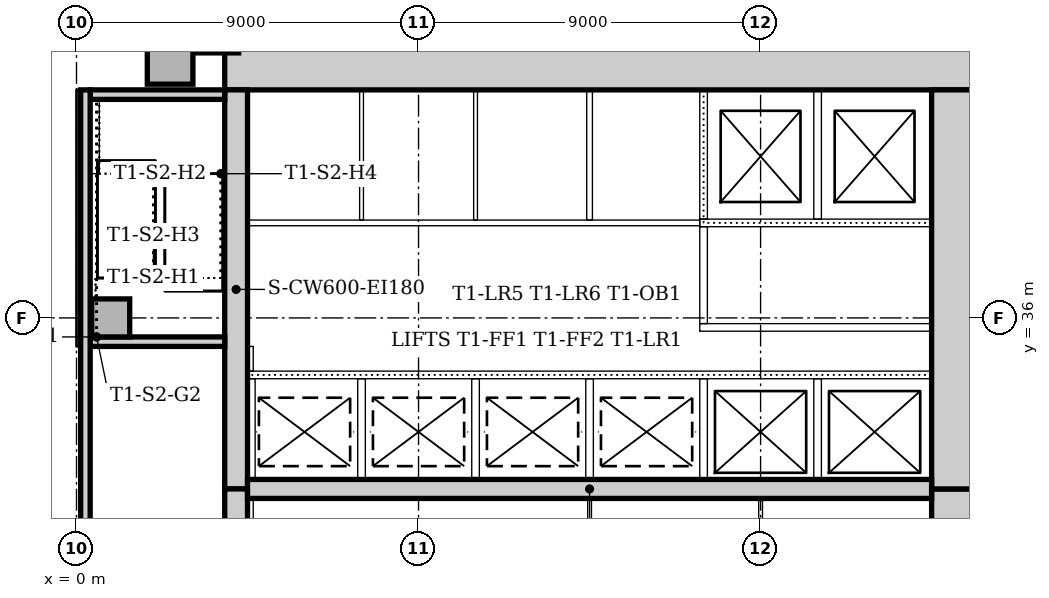
"""IFC4 building model, lengths in metres.
Left out: names, types, materials, properties, quantities, classifications, styles, units other than length and angle.
Written with IfcOpenShell. Run it as: python <this file> out.ifc"""

import sys

from ifc_helpers import new_model, si_unit, direction, frame, frame_2d, origin, origin_2d, place, context, subcontext, project, spatial, rectangle, extrude, element, fill, save


model = new_model("IFC4")
c1 = context("Model", 3, precision=1e-05, world=origin(), true_north=direction((0.0, 1.0)))
c2 = subcontext(c1, "Body", "Model", "MODEL_VIEW")
j1 = project(units=[si_unit("LENGTHUNIT", "METRE"), si_unit("PLANEANGLEUNIT", "RADIAN")], contexts=[c1])
p1 = place(None, origin())
s1 = spatial("IfcSite", under=j1, at=p1, CompositionType="ELEMENT")
p2 = place(p1, origin())
s2 = spatial("IfcBuilding", under=s1, at=p2, CompositionType="ELEMENT")
p3 = place(p2, origin())
s3 = spatial("IfcBuildingStorey", under=s2, at=p3, CompositionType="ELEMENT", Elevation=0.0)
p4 = place(p3, frame((23.7, 42.6, 0.0), z_axis=(0.0, 0.0, 1.0), x_axis=(-1.0, 0.0, 0.0)))
e1 = element("IfcWall", 1, at=p4, inside=s3, PredefinedType="SOLIDWALL", context=c2, shape_type="SweptSolid", body=[
    extrude(rectangle(XDim=19.8, YDim=1.2, at=frame_2d((9.9, 0.0))), origin(), (0.0, 0.0, 1.0), 6.0),
])
p5 = place(p3, frame((23.1, 21.0, 0.0), z_axis=(0.0, 0.0, 1.0), x_axis=(0.0, 1.0, 0.0)))
e2 = element("IfcWall", 2, at=p5, inside=s3, PredefinedType="SOLIDWALL", context=c2, shape_type="SweptSolid", body=[
    extrude(rectangle(XDim=10.5, YDim=1.2, at=frame_2d((5.25, 0.0))), origin(), (0.0, 0.0, 1.0), 6.0),
])
p6 = place(p5, frame((4.35, 0.0, 0.0)))
e3 = element("IfcOpeningElement", 3, at=p6, cuts=e2, PredefinedType="OPENING", context=c2, shape_type="SweptSolid", body=[
    extrude(rectangle(XDim=1.8, YDim=2.1, at=frame_2d((0.9, 1.05))), frame((0.0, 0.61, 0.0), z_axis=(0.0, -1.0, 0.0), x_axis=(1.0, 0.0, 0.0)), (0.0, 0.0, 1.0), 1.22),
])
p7 = place(p3, frame((23.1, 31.5, 0.0), z_axis=(0.0, 0.0, 1.0), x_axis=(0.0, 1.0, 0.0)))
e4 = element("IfcWall", 4, at=p7, inside=s3, PredefinedType="SOLIDWALL", context=c2, shape_type="SweptSolid", body=[
    extrude(rectangle(XDim=10.5, YDim=1.2, at=frame_2d((5.25, 0.0))), origin(), (0.0, 0.0, 1.0), 6.0),
])
p8 = place(p7, frame((3.15, 0.0, 0.0)))
e5 = element("IfcOpeningElement", 5, at=p8, cuts=e4, PredefinedType="OPENING", context=c2, shape_type="SweptSolid", body=[
    extrude(rectangle(XDim=1.0, YDim=2.1, at=frame_2d((0.5, 1.05))), frame((0.0, 0.61, 0.0), z_axis=(0.0, -1.0, 0.0), x_axis=(1.0, 0.0, 0.0)), (0.0, 0.0, 1.0), 1.22),
])
p9 = place(p7, frame((5.2, 0.0, 0.0)))
e6 = element("IfcOpeningElement", 6, at=p9, cuts=e4, PredefinedType="OPENING", context=c2, shape_type="SweptSolid", body=[
    extrude(rectangle(XDim=1.0, YDim=2.1, at=frame_2d((0.5, 1.05))), frame((0.0, 0.61, 0.0), z_axis=(0.0, -1.0, 0.0), x_axis=(1.0, 0.0, 0.0)), (0.0, 0.0, 1.0), 1.22),
])
p10 = place(p3, frame((4.2, 42.0, 0.0), z_axis=(0.0, 0.0, 1.0), x_axis=(0.0, -1.0, 0.0)))
e7 = element("IfcWall", 7, at=p10, inside=s3, PredefinedType="SOLIDWALL", context=c2, shape_type="SweptSolid", body=[
    extrude(rectangle(XDim=10.5, YDim=0.6, at=frame_2d((5.25, 0.0))), origin(), (0.0, 0.0, 1.0), 6.0),
])
p11 = place(p10, frame((5.3, 0.0, 0.0)))
e8 = element("IfcOpeningElement", 8, at=p11, cuts=e7, PredefinedType="OPENING", context=c2, shape_type="SweptSolid", body=[
    extrude(rectangle(XDim=1.0, YDim=2.1, at=frame_2d((0.5, 1.05))), frame((0.0, 0.31, 0.0), z_axis=(0.0, -1.0, 0.0), x_axis=(1.0, 0.0, 0.0)), (0.0, 0.0, 1.0), 0.62),
])
p12 = place(p3, frame((4.2, 31.5, 0.0), z_axis=(0.0, 0.0, 1.0), x_axis=(0.0, -1.0, 0.0)))
e9 = element("IfcWall", 9, at=p12, inside=s3, PredefinedType="SOLIDWALL", context=c2, shape_type="SweptSolid", body=[
    extrude(rectangle(XDim=10.5, YDim=0.6, at=frame_2d((5.25, 0.0))), origin(), (0.0, 0.0, 1.0), 6.0),
])
p13 = place(p12, frame((4.25, 0.0, 0.0)))
e10 = element("IfcOpeningElement", 10, at=p13, cuts=e9, PredefinedType="OPENING", context=c2, shape_type="SweptSolid", body=[
    extrude(rectangle(XDim=1.0, YDim=2.1, at=frame_2d((0.5, 1.05))), frame((0.0, 0.31, 0.0), z_axis=(0.0, -1.0, 0.0), x_axis=(1.0, 0.0, 0.0)), (0.0, 0.0, 1.0), 0.62),
])
p14 = place(p3, frame((4.5, 31.5, 0.0), z_axis=(0.0, 0.0, 1.0), x_axis=(1.0, 0.0, 0.0)))
e11 = element("IfcWall", 11, at=p14, inside=s3, PredefinedType="SOLIDWALL", context=c2, shape_type="SweptSolid", body=[
    extrude(rectangle(XDim=18.0, YDim=0.5, at=frame_2d((9.0, 0.0))), origin(), (0.0, 0.0, 1.0), 6.0),
])
p15 = place(p3, frame((0.36, 35.375, 0.0), z_axis=(0.0, 0.0, 1.0), x_axis=(1.0, 0.0, 0.0)))
e12 = element("IfcWall", 12, at=p15, inside=s3, PredefinedType="SOLIDWALL", context=c2, shape_type="SweptSolid", body=[
    extrude(rectangle(XDim=3.54, YDim=0.25, at=frame_2d((1.77, 0.0))), origin(), (0.0, 0.0, 1.0), 6.0),
])
p16 = place(p15, frame((2.14, 0.0, 0.0)))
e13 = element("IfcOpeningElement", 13, at=p16, cuts=e12, PredefinedType="OPENING", context=c2, shape_type="SweptSolid", body=[
    extrude(rectangle(XDim=1.0, YDim=2.1, at=frame_2d((0.5, 1.05))), frame((0.0, 0.135, 0.0), z_axis=(0.0, -1.0, 0.0), x_axis=(1.0, 0.0, 0.0)), (0.0, 0.0, 1.0), 0.27),
])
p17 = place(p3, frame((3.9, 41.875, 0.0), z_axis=(0.0, 0.0, 1.0), x_axis=(-1.0, 0.0, 0.0)))
e14 = element("IfcWall", 14, at=p17, inside=s3, PredefinedType="SOLIDWALL", context=c2, shape_type="SweptSolid", body=[
    extrude(rectangle(XDim=3.54, YDim=0.25, at=frame_2d((1.77, 0.0))), origin(), (0.0, 0.0, 1.0), 6.0),
])
p18 = place(p3, frame((0.235, 21.0, 0.0), z_axis=(0.0, 0.0, 1.0), x_axis=(0.0, 1.0, 0.0)))
e15 = element("IfcWall", 15, at=p18, inside=s3, PredefinedType="SOLIDWALL", context=c2, shape_type="SweptSolid", body=[
    extrude(rectangle(XDim=21.0, YDim=0.25, at=frame_2d((10.5, 0.0))), origin(), (0.0, 0.0, 1.0), 6.0),
])
p19 = place(p18, frame((10.0, 0.0, 0.0)))
e16 = element("IfcOpeningElement", 16, at=p19, cuts=e15, PredefinedType="OPENING", context=c2, shape_type="SweptSolid", body=[
    extrude(rectangle(XDim=1.0, YDim=2.1, at=frame_2d((0.5, 1.05))), frame((0.0, 0.135, 0.0), z_axis=(0.0, -1.0, 0.0), x_axis=(1.0, 0.0, 0.0)), (0.0, 0.0, 1.0), 0.27),
])
for number, where, z_axis, x_axis in (
    (17, (3.667, 43.574, 0.0), (0.0, 0.0, 1.0), (1.0, 0.0, 0.0)),
    (18, (2.463, 42.75, 0.0), (0.0, 0.0, 1.0), (1.0, 0.0, 0.0)),
):
    element("IfcColumn", number, at=place(p3, frame(where, z_axis=z_axis, x_axis=x_axis)), inside=s3, PredefinedType="COLUMN", context=c2, shape_type="SweptSolid", body=[
        extrude(rectangle(XDim=1.2, YDim=1.2, at=origin_2d()), origin(), (0.0, 0.0, 1.0), 5.7),
    ])
p20 = place(p3, frame((0.9, 36.0, 0.0), z_axis=(0.0, 0.0, 1.0), x_axis=(1.0, 0.0, 0.0)))
e19 = element("IfcColumn", 19, at=p20, inside=s3, PredefinedType="COLUMN", context=c2, shape_type="SweptSolid", body=[
    extrude(rectangle(XDim=1.0, YDim=1.0, at=origin_2d()), origin(), (0.0, 0.0, 1.0), 6.0),
])
p21 = place(p3, frame((0.48, 39.795, 0.0), z_axis=(0.0, 0.0, 1.0), x_axis=(0.0, 1.0, 0.0)))
e20 = element("IfcWall", 20, at=p21, inside=s3, PredefinedType="STANDARD", context=c2, shape_type="SweptSolid", body=[
    extrude(rectangle(XDim=1.955, YDim=0.24, at=frame_2d((0.978, 0.0))), origin(), (0.0, 0.0, 1.0), 6.0),
])
p22 = place(p3, frame((16.4, 35.75, 0.0), z_axis=(0.0, 0.0, 1.0), x_axis=(1.0, 0.0, 0.0)))
e21 = element("IfcWall", 21, at=p22, inside=s3, PredefinedType="PARTITIONING", context=c2, shape_type="SweptSolid", body=[
    extrude(rectangle(XDim=6.1, YDim=0.2, at=frame_2d((3.05, 0.0))), origin(), (0.0, 0.0, 1.0), 5.7),
])
p23 = place(p3, frame((16.4, 38.5, 0.0), z_axis=(0.0, 0.0, 1.0), x_axis=(1.0, 0.0, 0.0)))
e22 = element("IfcWall", 22, at=p23, inside=s3, PredefinedType="PARTITIONING", context=c2, shape_type="SweptSolid", body=[
    extrude(rectangle(XDim=6.1, YDim=0.2, at=frame_2d((3.05, 0.0))), origin(), (0.0, 0.0, 1.0), 5.7),
])
p24 = place(p23, frame((1.0, 0.0, 0.0)))
e23 = element("IfcOpeningElement", 23, at=p24, cuts=e22, PredefinedType="OPENING", context=c2, shape_type="SweptSolid", body=[
    extrude(rectangle(XDim=1.2, YDim=2.1, at=frame_2d((0.6, 1.05))), frame((0.0, 0.11, 0.0), z_axis=(0.0, -1.0, 0.0), x_axis=(1.0, 0.0, 0.0)), (0.0, 0.0, 1.0), 0.22),
])
p25 = place(p23, frame((4.0, 0.0, 0.0)))
e24 = element("IfcOpeningElement", 24, at=p25, cuts=e22, PredefinedType="OPENING", context=c2, shape_type="SweptSolid", body=[
    extrude(rectangle(XDim=1.2, YDim=2.1, at=frame_2d((0.6, 1.05))), frame((0.0, 0.11, 0.0), z_axis=(0.0, -1.0, 0.0), x_axis=(1.0, 0.0, 0.0)), (0.0, 0.0, 1.0), 0.22),
])
p26 = place(p3, frame((16.5, 35.85, 0.0), z_axis=(0.0, 0.0, 1.0), x_axis=(0.0, 1.0, 0.0)))
e25 = element("IfcWall", 25, at=p26, inside=s3, PredefinedType="PARTITIONING", context=c2, shape_type="SweptSolid", body=[
    extrude(rectangle(XDim=2.55, YDim=0.2, at=frame_2d((1.275, 0.0))), origin(), (0.0, 0.0, 1.0), 5.7),
])
p27 = place(p3, frame((4.5, 34.5, 0.0), z_axis=(0.0, 0.0, 1.0), x_axis=(1.0, 0.0, 0.0)))
e26 = element("IfcWall", 26, at=p27, inside=s3, PredefinedType="PARTITIONING", context=c2, shape_type="SweptSolid", body=[
    extrude(rectangle(XDim=18.0, YDim=0.2, at=frame_2d((9.0, 0.0))), origin(), (0.0, 0.0, 1.0), 5.7),
])
p28 = place(p27, frame((0.95, 0.0, 0.0)))
e27 = element("IfcOpeningElement", 27, at=p28, cuts=e26, PredefinedType="OPENING", context=c2, shape_type="SweptSolid", body=[
    extrude(rectangle(XDim=1.1, YDim=2.1, at=frame_2d((0.55, 1.05))), frame((0.0, 0.11, 0.0), z_axis=(0.0, -1.0, 0.0), x_axis=(1.0, 0.0, 0.0)), (0.0, 0.0, 1.0), 0.22),
])
p29 = place(p27, frame((3.95, 0.0, 0.0)))
e28 = element("IfcOpeningElement", 28, at=p29, cuts=e26, PredefinedType="OPENING", context=c2, shape_type="SweptSolid", body=[
    extrude(rectangle(XDim=1.1, YDim=2.1, at=frame_2d((0.55, 1.05))), frame((0.0, 0.11, 0.0), z_axis=(0.0, -1.0, 0.0), x_axis=(1.0, 0.0, 0.0)), (0.0, 0.0, 1.0), 0.22),
])
p30 = place(p27, frame((6.95, 0.0, 0.0)))
e29 = element("IfcOpeningElement", 29, at=p30, cuts=e26, PredefinedType="OPENING", context=c2, shape_type="SweptSolid", body=[
    extrude(rectangle(XDim=1.1, YDim=2.1, at=frame_2d((0.55, 1.05))), frame((0.0, 0.11, 0.0), z_axis=(0.0, -1.0, 0.0), x_axis=(1.0, 0.0, 0.0)), (0.0, 0.0, 1.0), 0.22),
])
p31 = place(p27, frame((9.95, 0.0, 0.0)))
e30 = element("IfcOpeningElement", 30, at=p31, cuts=e26, PredefinedType="OPENING", context=c2, shape_type="SweptSolid", body=[
    extrude(rectangle(XDim=1.1, YDim=2.1, at=frame_2d((0.55, 1.05))), frame((0.0, 0.11, 0.0), z_axis=(0.0, -1.0, 0.0), x_axis=(1.0, 0.0, 0.0)), (0.0, 0.0, 1.0), 0.22),
])
p32 = place(p27, frame((12.95, 0.0, 0.0)))
e31 = element("IfcOpeningElement", 31, at=p32, cuts=e26, PredefinedType="OPENING", context=c2, shape_type="SweptSolid", body=[
    extrude(rectangle(XDim=1.1, YDim=2.1, at=frame_2d((0.55, 1.05))), frame((0.0, 0.11, 0.0), z_axis=(0.0, -1.0, 0.0), x_axis=(1.0, 0.0, 0.0)), (0.0, 0.0, 1.0), 0.22),
])
p33 = place(p27, frame((15.95, 0.0, 0.0)))
e32 = element("IfcOpeningElement", 32, at=p33, cuts=e26, PredefinedType="OPENING", context=c2, shape_type="SweptSolid", body=[
    extrude(rectangle(XDim=1.1, YDim=2.1, at=frame_2d((0.55, 1.05))), frame((0.0, 0.11, 0.0), z_axis=(0.0, -1.0, 0.0), x_axis=(1.0, 0.0, 0.0)), (0.0, 0.0, 1.0), 0.22),
])
for number, where, z_axis, x_axis in (
    (33, (16.5, 38.6, 0.0), (0.0, 0.0, 1.0), (0.0, 1.0, 0.0)),
    (34, (19.5, 38.6, 0.0), (0.0, 0.0, 1.0), (0.0, 1.0, 0.0)),
):
    element("IfcWall", number, at=place(p3, frame(where, z_axis=z_axis, x_axis=x_axis)), inside=s3, PredefinedType="PARTITIONING", context=c2, shape_type="SweptSolid", body=[
        extrude(rectangle(XDim=3.4, YDim=0.2, at=frame_2d((1.7, 0.0))), origin(), (0.0, 0.0, 1.0), 5.7),
    ])
for number, where, z_axis, x_axis in (
    (35, (4.6, 31.75, 0.0), (0.0, 0.0, 1.0), (0.0, 1.0, 0.0)),
    (36, (7.5, 31.75, 0.0), (0.0, 0.0, 1.0), (0.0, 1.0, 0.0)),
    (37, (10.5, 31.75, 0.0), (0.0, 0.0, 1.0), (0.0, 1.0, 0.0)),
    (38, (13.5, 31.75, 0.0), (0.0, 0.0, 1.0), (0.0, 1.0, 0.0)),
    (39, (16.5, 31.75, 0.0), (0.0, 0.0, 1.0), (0.0, 1.0, 0.0)),
    (40, (19.5, 31.75, 0.0), (0.0, 0.0, 1.0), (0.0, 1.0, 0.0)),
):
    element("IfcWall", number, at=place(p3, frame(where, z_axis=z_axis, x_axis=x_axis)), inside=s3, PredefinedType="PARTITIONING", context=c2, shape_type="SweptSolid", body=[
        extrude(rectangle(XDim=2.65, YDim=0.2, at=frame_2d((1.325, 0.0))), origin(), (0.0, 0.0, 1.0), 5.7),
    ])
p34 = place(p3, frame((4.5, 38.5, 0.0), z_axis=(0.0, 0.0, 1.0), x_axis=(1.0, 0.0, 0.0)))
e41 = element("IfcWall", 41, at=p34, inside=s3, PredefinedType="PARTITIONING", context=c2, shape_type="SweptSolid", body=[
    extrude(rectangle(XDim=11.9, YDim=0.15, at=frame_2d((5.95, 0.0))), origin(), (0.0, 0.0, 1.0), 5.7),
])
p35 = place(p34, frame((1.1, 0.0, 0.0)))
e42 = element("IfcOpeningElement", 42, at=p35, cuts=e41, PredefinedType="OPENING", context=c2, shape_type="SweptSolid", body=[
    extrude(rectangle(XDim=0.9, YDim=2.1, at=frame_2d((0.45, 1.05))), frame((0.0, 0.085, 0.0), z_axis=(0.0, -1.0, 0.0), x_axis=(1.0, 0.0, 0.0)), (0.0, 0.0, 1.0), 0.17),
])
p36 = place(p34, frame((4.05, 0.0, 0.0)))
e43 = element("IfcOpeningElement", 43, at=p36, cuts=e41, PredefinedType="OPENING", context=c2, shape_type="SweptSolid", body=[
    extrude(rectangle(XDim=0.9, YDim=2.1, at=frame_2d((0.45, 1.05))), frame((0.0, 0.085, 0.0), z_axis=(0.0, -1.0, 0.0), x_axis=(1.0, 0.0, 0.0)), (0.0, 0.0, 1.0), 0.17),
])
p37 = place(p34, frame((7.05, 0.0, 0.0)))
e44 = element("IfcOpeningElement", 44, at=p37, cuts=e41, PredefinedType="OPENING", context=c2, shape_type="SweptSolid", body=[
    extrude(rectangle(XDim=0.9, YDim=2.1, at=frame_2d((0.45, 1.05))), frame((0.0, 0.085, 0.0), z_axis=(0.0, -1.0, 0.0), x_axis=(1.0, 0.0, 0.0)), (0.0, 0.0, 1.0), 0.17),
])
p38 = place(p34, frame((9.95, 0.0, 0.0)))
e45 = element("IfcOpeningElement", 45, at=p38, cuts=e41, PredefinedType="OPENING", context=c2, shape_type="SweptSolid", body=[
    extrude(rectangle(XDim=0.8, YDim=2.1, at=frame_2d((0.4, 1.05))), frame((0.0, 0.085, 0.0), z_axis=(0.0, -1.0, 0.0), x_axis=(1.0, 0.0, 0.0)), (0.0, 0.0, 1.0), 0.17),
])
p39 = place(p3, frame((4.575, 28.575, 0.0), z_axis=(0.0, 0.0, 1.0), x_axis=(0.0, 1.0, 0.0)))
e46 = element("IfcWall", 46, at=p39, inside=s3, PredefinedType="PARTITIONING", context=c2, shape_type="SweptSolid", body=[
    extrude(rectangle(XDim=2.675, YDim=0.15, at=frame_2d((1.337, 0.0))), origin(), (0.0, 0.0, 1.0), 5.7),
])
p40 = place(p3, frame((4.575, 34.6, 0.0), z_axis=(0.0, 0.0, 1.0), x_axis=(0.0, 1.0, 0.0)))
e47 = element("IfcWall", 47, at=p40, inside=s3, PredefinedType="PARTITIONING", context=c2, shape_type="SweptSolid", body=[
    extrude(rectangle(XDim=0.65, YDim=0.15, at=frame_2d((0.325, 0.0))), origin(), (0.0, 0.0, 1.0), 5.7),
])
p41 = place(p3, frame((13.5, 38.575, 0.0), z_axis=(0.0, 0.0, 1.0), x_axis=(0.0, 1.0, 0.0)))
e48 = element("IfcWall", 48, at=p41, inside=s3, PredefinedType="PARTITIONING", context=c2, shape_type="SweptSolid", body=[
    extrude(rectangle(XDim=3.425, YDim=0.15, at=frame_2d((1.712, 0.0))), origin(), (0.0, 0.0, 1.0), 5.7),
])
for number, where, z_axis, x_axis in (
    (49, (7.5, 38.575, 0.0), (0.0, 0.0, 1.0), (0.0, 1.0, 0.0)),
    (50, (10.5, 38.575, 0.0), (0.0, 0.0, 1.0), (0.0, 1.0, 0.0)),
):
    element("IfcWall", number, at=place(p3, frame(where, z_axis=z_axis, x_axis=x_axis)), inside=s3, PredefinedType="PARTITIONING", context=c2, shape_type="SweptSolid", body=[
        extrude(rectangle(XDim=3.425, YDim=0.1, at=frame_2d((1.712, 0.0))), origin(), (0.0, 0.0, 1.0), 5.7),
    ])
for number, where, z_axis, x_axis in (
    (51, (13.5, 28.575, 0.0), (0.0, 0.0, 1.0), (0.0, 1.0, 0.0)),
    (52, (18.0, 28.575, 0.0), (0.0, 0.0, 1.0), (0.0, 1.0, 0.0)),
):
    element("IfcWall", number, at=place(p3, frame(where, z_axis=z_axis, x_axis=x_axis)), inside=s3, PredefinedType="PARTITIONING", context=c2, shape_type="SweptSolid", body=[
        extrude(rectangle(XDim=2.675, YDim=0.1, at=frame_2d((1.337, 0.0))), origin(), (0.0, 0.0, 1.0), 5.7),
    ])
p42 = place(p11, frame((1.0, 0.0, 0.0), z_axis=(0.0, 0.0, 1.0), x_axis=(-1.0, 0.0, 0.0)))
e53 = element("IfcDoor", 53, at=p42, inside=s3, OperationType="SINGLE_SWING_LEFT", PredefinedType="DOOR", context=c2, shape_type="SweptSolid", body=[
    extrude(rectangle(XDim=1.0, YDim=2.1, at=frame_2d((0.5, 1.05))), frame((0.0, 0.025, 0.0), z_axis=(0.0, -1.0, 0.0), x_axis=(1.0, 0.0, 0.0)), (0.0, 0.0, 1.0), 0.05),
])
fill(e8, e53)
p43 = place(p16, origin())
e54 = element("IfcDoor", 54, at=p43, inside=s3, OperationType="SINGLE_SWING_RIGHT", PredefinedType="DOOR", context=c2, shape_type="SweptSolid", body=[
    extrude(rectangle(XDim=1.0, YDim=2.1, at=frame_2d((0.5, 1.05))), frame((0.0, 0.025, 0.0), z_axis=(0.0, -1.0, 0.0), x_axis=(1.0, 0.0, 0.0)), (0.0, 0.0, 1.0), 0.05),
])
fill(e13, e54)
p44 = place(p28, origin())
e55 = element("IfcDoor", 55, at=p44, inside=s3, OperationType="SLIDING_TO_LEFT", PredefinedType="DOOR", context=c2, shape_type="SweptSolid", body=[
    extrude(rectangle(XDim=1.1, YDim=2.1, at=frame_2d((0.55, 1.05))), frame((0.0, 0.025, 0.0), z_axis=(0.0, -1.0, 0.0), x_axis=(1.0, 0.0, 0.0)), (0.0, 0.0, 1.0), 0.05),
])
fill(e27, e55)
p45 = place(p29, origin())
e56 = element("IfcDoor", 56, at=p45, inside=s3, OperationType="SLIDING_TO_LEFT", PredefinedType="DOOR", context=c2, shape_type="SweptSolid", body=[
    extrude(rectangle(XDim=1.1, YDim=2.1, at=frame_2d((0.55, 1.05))), frame((0.0, 0.025, 0.0), z_axis=(0.0, -1.0, 0.0), x_axis=(1.0, 0.0, 0.0)), (0.0, 0.0, 1.0), 0.05),
])
fill(e28, e56)
p46 = place(p30, origin())
e57 = element("IfcDoor", 57, at=p46, inside=s3, OperationType="SLIDING_TO_LEFT", PredefinedType="DOOR", context=c2, shape_type="SweptSolid", body=[
    extrude(rectangle(XDim=1.1, YDim=2.1, at=frame_2d((0.55, 1.05))), frame((0.0, 0.025, 0.0), z_axis=(0.0, -1.0, 0.0), x_axis=(1.0, 0.0, 0.0)), (0.0, 0.0, 1.0), 0.05),
])
fill(e29, e57)
p47 = place(p31, origin())
e58 = element("IfcDoor", 58, at=p47, inside=s3, OperationType="SLIDING_TO_LEFT", PredefinedType="DOOR", context=c2, shape_type="SweptSolid", body=[
    extrude(rectangle(XDim=1.1, YDim=2.1, at=frame_2d((0.55, 1.05))), frame((0.0, 0.025, 0.0), z_axis=(0.0, -1.0, 0.0), x_axis=(1.0, 0.0, 0.0)), (0.0, 0.0, 1.0), 0.05),
])
fill(e30, e58)
p48 = place(p32, origin())
e59 = element("IfcDoor", 59, at=p48, inside=s3, OperationType="SLIDING_TO_LEFT", PredefinedType="DOOR", context=c2, shape_type="SweptSolid", body=[
    extrude(rectangle(XDim=1.1, YDim=2.1, at=frame_2d((0.55, 1.05))), frame((0.0, 0.025, 0.0), z_axis=(0.0, -1.0, 0.0), x_axis=(1.0, 0.0, 0.0)), (0.0, 0.0, 1.0), 0.05),
])
fill(e31, e59)
p49 = place(p33, origin())
e60 = element("IfcDoor", 60, at=p49, inside=s3, OperationType="SLIDING_TO_LEFT", PredefinedType="DOOR", context=c2, shape_type="SweptSolid", body=[
    extrude(rectangle(XDim=1.1, YDim=2.1, at=frame_2d((0.55, 1.05))), frame((0.0, 0.025, 0.0), z_axis=(0.0, -1.0, 0.0), x_axis=(1.0, 0.0, 0.0)), (0.0, 0.0, 1.0), 0.05),
])
fill(e32, e60)
p50 = place(p24, origin())
e61 = element("IfcDoor", 61, at=p50, inside=s3, OperationType="SLIDING_TO_LEFT", PredefinedType="DOOR", context=c2, shape_type="SweptSolid", body=[
    extrude(rectangle(XDim=1.2, YDim=2.1, at=frame_2d((0.6, 1.05))), frame((0.0, 0.025, 0.0), z_axis=(0.0, -1.0, 0.0), x_axis=(1.0, 0.0, 0.0)), (0.0, 0.0, 1.0), 0.05),
])
fill(e23, e61)
p51 = place(p25, origin())
e62 = element("IfcDoor", 62, at=p51, inside=s3, OperationType="SLIDING_TO_LEFT", PredefinedType="DOOR", context=c2, shape_type="SweptSolid", body=[
    extrude(rectangle(XDim=1.2, YDim=2.1, at=frame_2d((0.6, 1.05))), frame((0.0, 0.025, 0.0), z_axis=(0.0, -1.0, 0.0), x_axis=(1.0, 0.0, 0.0)), (0.0, 0.0, 1.0), 0.05),
])
fill(e24, e62)
p52 = place(p8, frame((1.0, 0.0, 0.0), z_axis=(0.0, 0.0, 1.0), x_axis=(-1.0, 0.0, 0.0)))
e63 = element("IfcDoor", 63, at=p52, inside=s3, OperationType="SINGLE_SWING_LEFT", PredefinedType="DOOR", context=c2, shape_type="SweptSolid", body=[
    extrude(rectangle(XDim=1.0, YDim=2.1, at=frame_2d((0.5, 1.05))), frame((0.0, 0.025, 0.0), z_axis=(0.0, -1.0, 0.0), x_axis=(1.0, 0.0, 0.0)), (0.0, 0.0, 1.0), 0.05),
])
fill(e5, e63)
p53 = place(p9, frame((1.0, 0.0, 0.0), z_axis=(0.0, 0.0, 1.0), x_axis=(-1.0, 0.0, 0.0)))
e64 = element("IfcDoor", 64, at=p53, inside=s3, OperationType="SINGLE_SWING_RIGHT", PredefinedType="DOOR", context=c2, shape_type="SweptSolid", body=[
    extrude(rectangle(XDim=1.0, YDim=2.1, at=frame_2d((0.5, 1.05))), frame((0.0, 0.025, 0.0), z_axis=(0.0, -1.0, 0.0), x_axis=(1.0, 0.0, 0.0)), (0.0, 0.0, 1.0), 0.05),
])
fill(e6, e64)
p54 = place(p35, origin())
e65 = element("IfcDoor", 65, at=p54, inside=s3, OperationType="SINGLE_SWING_LEFT", PredefinedType="DOOR", context=c2, shape_type="SweptSolid", body=[
    extrude(rectangle(XDim=0.9, YDim=2.1, at=frame_2d((0.45, 1.05))), frame((0.0, 0.025, 0.0), z_axis=(0.0, -1.0, 0.0), x_axis=(1.0, 0.0, 0.0)), (0.0, 0.0, 1.0), 0.05),
])
fill(e42, e65)
p55 = place(p36, origin())
e66 = element("IfcDoor", 66, at=p55, inside=s3, OperationType="SINGLE_SWING_LEFT", PredefinedType="DOOR", context=c2, shape_type="SweptSolid", body=[
    extrude(rectangle(XDim=0.9, YDim=2.1, at=frame_2d((0.45, 1.05))), frame((0.0, 0.025, 0.0), z_axis=(0.0, -1.0, 0.0), x_axis=(1.0, 0.0, 0.0)), (0.0, 0.0, 1.0), 0.05),
])
fill(e43, e66)
p56 = place(p37, origin())
e67 = element("IfcDoor", 67, at=p56, inside=s3, OperationType="SINGLE_SWING_RIGHT", PredefinedType="DOOR", context=c2, shape_type="SweptSolid", body=[
    extrude(rectangle(XDim=0.9, YDim=2.1, at=frame_2d((0.45, 1.05))), frame((0.0, 0.025, 0.0), z_axis=(0.0, -1.0, 0.0), x_axis=(1.0, 0.0, 0.0)), (0.0, 0.0, 1.0), 0.05),
])
fill(e44, e67)
p57 = place(p38, origin())
e68 = element("IfcDoor", 68, at=p57, inside=s3, OperationType="SINGLE_SWING_LEFT", PredefinedType="DOOR", context=c2, shape_type="SweptSolid", body=[
    extrude(rectangle(XDim=0.8, YDim=2.1, at=frame_2d((0.4, 1.05))), frame((0.0, 0.025, 0.0), z_axis=(0.0, -1.0, 0.0), x_axis=(1.0, 0.0, 0.0)), (0.0, 0.0, 1.0), 0.05),
])
fill(e45, e68)
p58 = place(p19, origin())
e69 = element("IfcDoor", 69, at=p58, inside=s3, OperationType="SINGLE_SWING_RIGHT", PredefinedType="DOOR", context=c2, shape_type="SweptSolid", body=[
    extrude(rectangle(XDim=1.0, YDim=2.1, at=frame_2d((0.5, 1.05))), frame((0.0, 0.025, 0.0), z_axis=(0.0, -1.0, 0.0), x_axis=(1.0, 0.0, 0.0)), (0.0, 0.0, 1.0), 0.05),
])
fill(e16, e69)
save(model, sys.argv[1])
